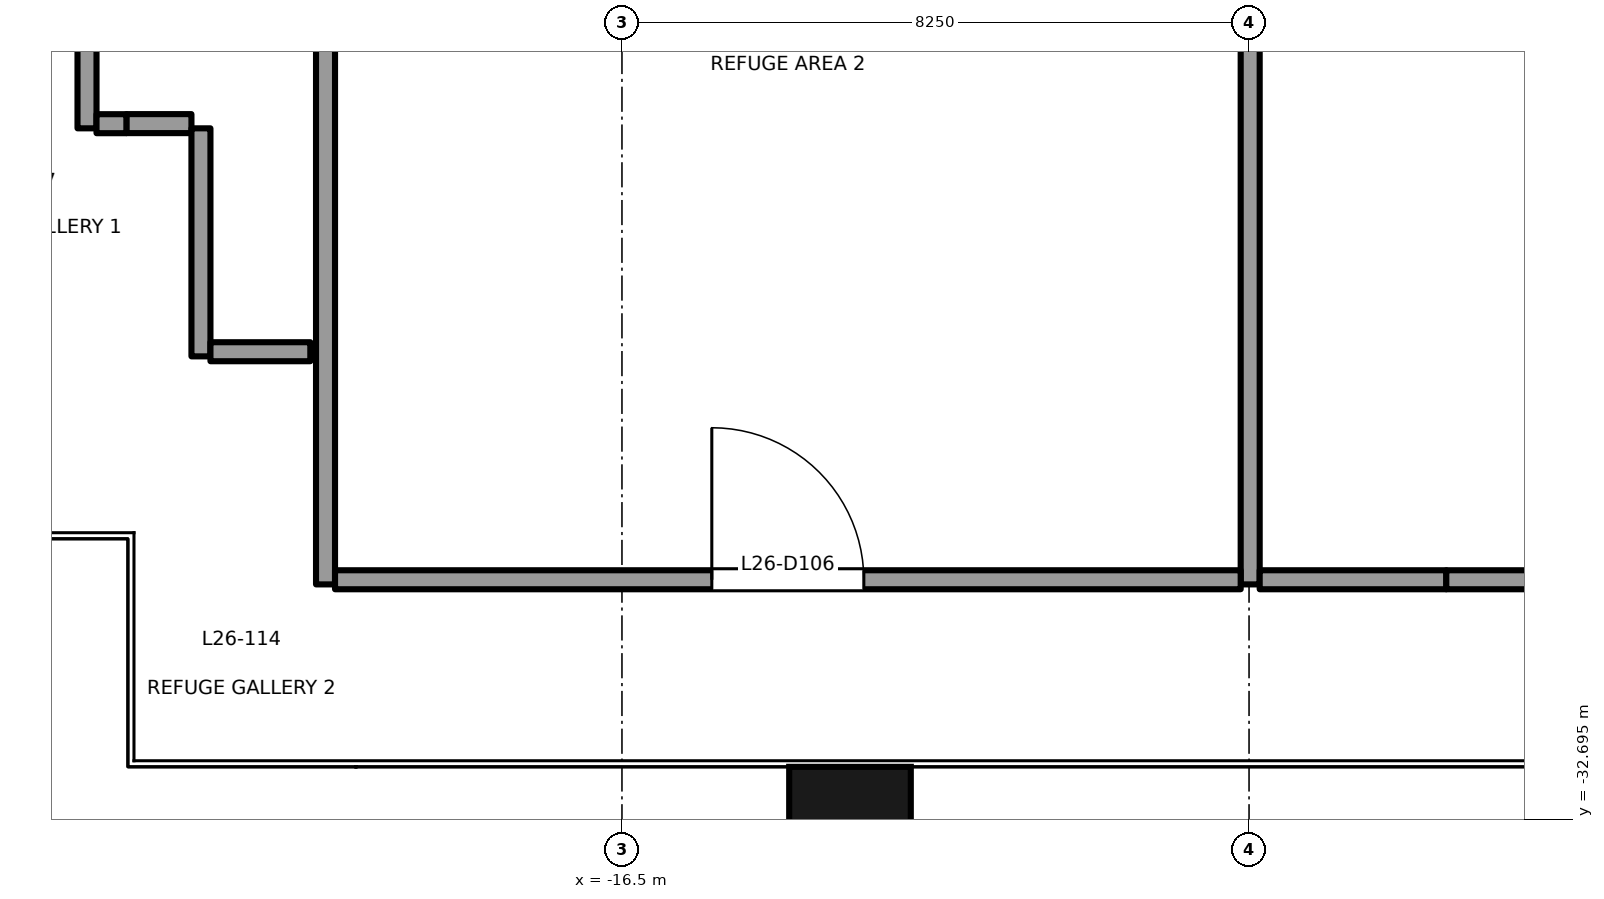
"""IFC4 building model, lengths in metres.
Left out: names, types, materials, properties, quantities, classifications, styles, units other than length and angle.
Written with IfcOpenShell. Run it as: python <this file> out.ifc"""

import sys

from ifc_helpers import new_model, si_unit, direction, frame, frame_2d, origin, origin_2d, place, context, subcontext, project, spatial, rectangle, extrude, element, fill, save


model = new_model("IFC4")
c1 = context("Model", 3, precision=1e-05, world=origin(), true_north=direction((0.0, 1.0)))
c2 = subcontext(c1, "Body", "Model", "MODEL_VIEW")
j1 = project(units=[si_unit("LENGTHUNIT", "METRE"), si_unit("PLANEANGLEUNIT", "RADIAN")], contexts=[c1])
p1 = place(None, origin())
s1 = spatial("IfcSite", under=j1, at=p1, CompositionType="ELEMENT")
p2 = place(p1, origin())
s2 = spatial("IfcBuilding", under=s1, at=p2, CompositionType="ELEMENT")
p3 = place(p2, frame((0.0, 0.0, 115.7)))
s3 = spatial("IfcBuildingStorey", under=s2, at=p3, CompositionType="ELEMENT", Elevation=115.7)
p4 = place(p3, frame((-13.5, -32.9, -0.2), z_axis=(0.0, 0.0, 1.0), x_axis=(1.0, 0.0, 0.0)))
e1 = element("IfcColumn", 1, at=p4, inside=s3, PredefinedType="COLUMN", context=c2, shape_type="SweptSolid", body=[
    extrude(rectangle(XDim=1.6, YDim=1.8, at=origin_2d()), origin(), (0.0, 0.0, 1.0), 5.0),
])
p5 = place(p3, frame((-20.4, -10.78, 0.0), z_axis=(0.0, 0.0, 1.0), x_axis=(0.0, -1.0, 0.0)))
e2 = element("IfcWall", 2, at=p5, inside=s3, PredefinedType="PARTITIONING", context=c2, shape_type="SweptSolid", body=[
    extrude(rectangle(XDim=18.82, YDim=0.25, at=frame_2d((9.41, 0.0))), origin(), (0.0, 0.0, 1.0), 4.8),
])
p6 = place(p3, frame((-22.164, -23.538, 0.0), z_axis=(0.0, 0.0, 1.0), x_axis=(-1.0, 0.0, 0.0)))
e3 = element("IfcWall", 3, at=p6, inside=s3, PredefinedType="PARTITIONING", context=c2, shape_type="SweptSolid", body=[
    extrude(rectangle(XDim=0.856, YDim=0.25, at=frame_2d((0.428, 0.0))), origin(), (0.0, 0.0, 1.0), 4.8),
])
p7 = place(p3, frame((-22.039, -26.6, 0.0), z_axis=(0.0, 0.0, 1.0), x_axis=(0.0, 1.0, 0.0)))
e4 = element("IfcWall", 4, at=p7, inside=s3, PredefinedType="PARTITIONING", context=c2, shape_type="SweptSolid", body=[
    extrude(rectangle(XDim=3.0, YDim=0.25, at=frame_2d((1.5, 0.0))), origin(), (0.0, 0.0, 1.0), 4.8),
])
p8 = place(p3, frame((-20.6, -26.539, 0.0), z_axis=(0.0, 0.0, 1.0), x_axis=(-1.0, 0.0, 0.0)))
e5 = element("IfcWall", 5, at=p8, inside=s3, PredefinedType="PARTITIONING", context=c2, shape_type="SweptSolid", body=[
    extrude(rectangle(XDim=1.314, YDim=0.25, at=frame_2d((0.657, 0.0))), origin(), (0.0, 0.0, 1.0), 4.8),
])
p9 = place(p3, frame((-23.538, -0.4, 0.0), z_axis=(0.0, 0.0, 1.0), x_axis=(0.0, -1.0, 0.0)))
e6 = element("IfcWall", 6, at=p9, inside=s3, PredefinedType="PARTITIONING", context=c2, shape_type="SweptSolid", body=[
    extrude(rectangle(XDim=23.2, YDim=0.25, at=frame_2d((11.6, 0.0))), origin(), (0.0, 0.0, 1.0), 4.4),
])
p10 = place(p9, frame((10.6, 0.0, 0.0)))
e7 = element("IfcOpeningElement", 7, at=p10, cuts=e6, PredefinedType="OPENING", context=c2, shape_type="SweptSolid", body=[
    extrude(rectangle(XDim=2.0, YDim=2.1, at=frame_2d((1.0, 1.05))), frame((0.0, 0.135, 0.0), z_axis=(0.0, -1.0, 0.0), x_axis=(1.0, 0.0, 0.0)), (0.0, 0.0, 1.0), 0.271),
])
p11 = place(p3, frame((-23.02, -23.539, 0.0), z_axis=(0.0, 0.0, 1.0), x_axis=(-1.0, 0.0, 0.0)))
e8 = element("IfcWall", 8, at=p11, inside=s3, PredefinedType="PARTITIONING", context=c2, shape_type="SweptSolid", body=[
    extrude(rectangle(XDim=0.393, YDim=0.25, at=frame_2d((0.197, 0.0))), origin(), (0.0, 0.0, 1.0), 4.8),
])
p12 = place(p3, frame((-8.235, -15.0, 0.0), z_axis=(0.0, 0.0, 1.0), x_axis=(0.0, -1.0, 0.0)))
e9 = element("IfcWall", 9, at=p12, inside=s3, PredefinedType="PARTITIONING", context=c2, shape_type="SweptSolid", body=[
    extrude(rectangle(XDim=14.6, YDim=0.25, at=frame_2d((7.3, 0.0))), origin(), (0.0, 0.0, 1.0), 3.7),
])
p13 = place(p3, frame((-20.275, -29.539, 0.0), z_axis=(0.0, 0.0, 1.0), x_axis=(1.0, 0.0, 0.0)))
e10 = element("IfcWall", 10, at=p13, inside=s3, PredefinedType="PARTITIONING", context=c2, shape_type="SweptSolid", body=[
    extrude(rectangle(XDim=11.915, YDim=0.25, at=frame_2d((5.958, 0.0))), origin(), (0.0, 0.0, 1.0), 2.75),
])
p14 = place(p13, frame((4.957, 0.0, 0.0)))
e11 = element("IfcOpeningElement", 11, at=p14, cuts=e10, PredefinedType="OPENING", context=c2, shape_type="SweptSolid", body=[
    extrude(rectangle(XDim=2.0, YDim=2.1, at=frame_2d((1.0, 1.05))), frame((0.0, 0.135, 0.0), z_axis=(0.0, -1.0, 0.0), x_axis=(1.0, 0.0, 0.0)), (0.0, 0.0, 1.0), 0.271),
])
p15 = place(p3, frame((-5.655, -29.539, 0.0), z_axis=(0.0, 0.0, 1.0), x_axis=(-1.0, 0.0, 0.0)))
e12 = element("IfcWall", 12, at=p15, inside=s3, PredefinedType="PARTITIONING", context=c2, shape_type="SweptSolid", body=[
    extrude(rectangle(XDim=2.455, YDim=0.25, at=frame_2d((1.228, 0.0))), origin(), (0.0, 0.0, 1.0), 3.7),
])
p16 = place(p3, frame((-5.655, -29.539, 0.0), z_axis=(0.0, 0.0, 1.0), x_axis=(1.0, 0.0, 0.0)))
e13 = element("IfcWall", 13, at=p16, inside=s3, PredefinedType="PARTITIONING", context=c2, shape_type="SweptSolid", body=[
    extrude(rectangle(XDim=12.487, YDim=0.25, at=frame_2d((6.244, 0.0))), origin(), (0.0, 0.0, 1.0), 2.75),
])
p17 = place(p16, frame((5.244, 0.0, 0.0)))
e14 = element("IfcOpeningElement", 14, at=p17, cuts=e13, PredefinedType="OPENING", context=c2, shape_type="SweptSolid", body=[
    extrude(rectangle(XDim=2.0, YDim=2.1, at=frame_2d((1.0, 1.05))), frame((0.0, 0.135, 0.0), z_axis=(0.0, -1.0, 0.0), x_axis=(1.0, 0.0, 0.0)), (0.0, 0.0, 1.0), 0.271),
])
p18 = place(p14, origin())
e15 = element("IfcDoor", 15, at=p18, inside=s3, OperationType="DOUBLE_DOOR_SINGLE_SWING", PredefinedType="DOOR", context=c2, shape_type="SweptSolid", body=[
    extrude(rectangle(XDim=2.0, YDim=2.1, at=frame_2d((1.0, 1.05))), frame((0.0, 0.025, 0.0), z_axis=(0.0, -1.0, 0.0), x_axis=(1.0, 0.0, 0.0)), (0.0, 0.0, 1.0), 0.05),
])
fill(e11, e15)
save(model, sys.argv[1])
